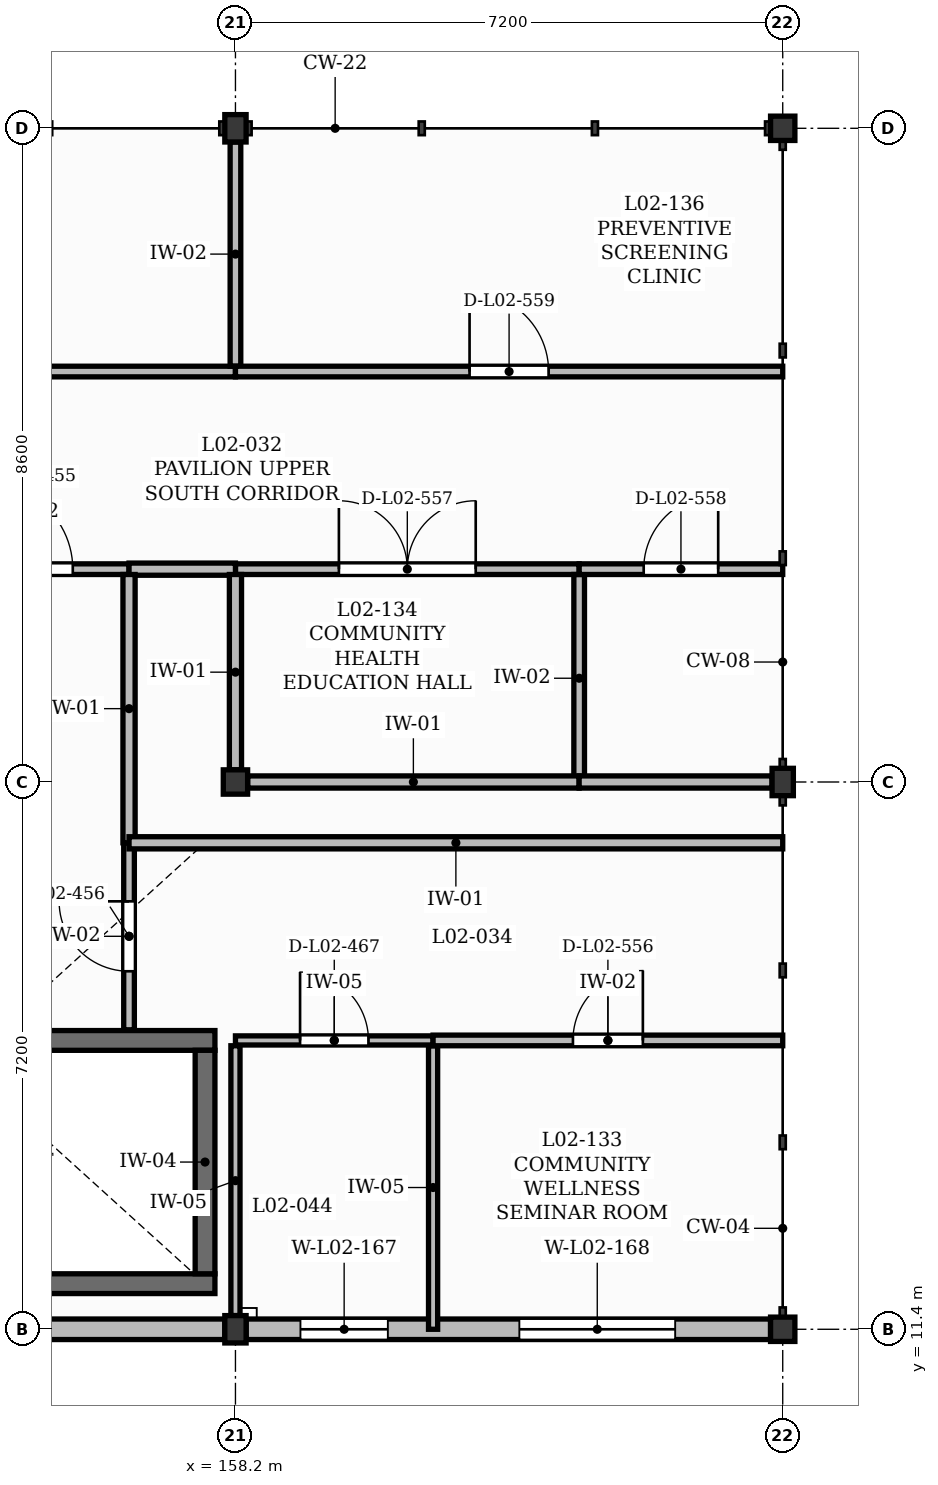
"""IFC4 building model, lengths in metres.
Left out: names, types, materials, properties, quantities, classifications, styles, units other than length and angle.
Written with IfcOpenShell. Run it as: python <this file> out.ifc"""

import sys

from ifc_helpers import new_model, si_unit, direction, frame, frame_2d, origin, origin_2d, place, context, subcontext, project, spatial, rectangle, extrude, element, fill, save


model = new_model("IFC4")
c1 = context("Model", 3, precision=1e-05, world=origin(), true_north=direction((0.0, 1.0)))
c2 = subcontext(c1, "Body", "Model", "MODEL_VIEW")
j1 = project(units=[si_unit("LENGTHUNIT", "METRE"), si_unit("PLANEANGLEUNIT", "RADIAN")], contexts=[c1])
p1 = place(None, origin())
s1 = spatial("IfcSite", under=j1, at=p1, CompositionType="ELEMENT")
p2 = place(p1, origin())
s2 = spatial("IfcBuilding", under=s1, at=p2, CompositionType="ELEMENT")
p3 = place(p2, frame((0.0, 0.0, 9.0)))
s3 = spatial("IfcBuildingStorey", under=s2, at=p3, CompositionType="ELEMENT", Elevation=9.0)
p4 = place(p3, frame((158.2, 11.4, 0.0), z_axis=(0.0, 0.0, 1.0), x_axis=(1.0, 0.0, 0.0)))
e1 = element("IfcColumn", 1, at=p4, inside=s3, PredefinedType="COLUMN", context=c2, shape_type="SweptSolid", body=[
    extrude(rectangle(XDim=0.28, YDim=0.36, at=origin_2d()), origin(), (0.0, 0.0, 1.0), 7.57),
])
p5 = place(p3, frame((158.2, 18.6, 0.0), z_axis=(0.0, 0.0, 1.0), x_axis=(1.0, 0.0, 0.0)))
e2 = element("IfcColumn", 2, at=p5, inside=s3, PredefinedType="COLUMN", context=c2, shape_type="SweptSolid", body=[
    extrude(rectangle(XDim=0.32, YDim=0.32, at=origin_2d()), origin(), (0.0, 0.0, 1.0), 7.57),
])
p6 = place(p3, frame((158.2, 27.2, 0.0), z_axis=(0.0, 0.0, 1.0), x_axis=(1.0, 0.0, 0.0)))
e3 = element("IfcColumn", 3, at=p6, inside=s3, PredefinedType="COLUMN", context=c2, shape_type="SweptSolid", body=[
    extrude(rectangle(XDim=0.28, YDim=0.36, at=origin_2d()), origin(), (0.0, 0.0, 1.0), 7.57),
])
p7 = place(p3, frame((165.4, 11.4, 0.0), z_axis=(0.0, 0.0, 1.0), x_axis=(1.0, 0.0, 0.0)))
e4 = element("IfcColumn", 4, at=p7, inside=s3, PredefinedType="COLUMN", context=c2, shape_type="SweptSolid", body=[
    extrude(rectangle(XDim=0.32, YDim=0.32, at=origin_2d()), origin(), (0.0, 0.0, 1.0), 9.365),
])
p8 = place(p3, frame((165.4, 18.6, 0.0), z_axis=(0.0, 0.0, 1.0), x_axis=(1.0, 0.0, 0.0)))
e5 = element("IfcColumn", 5, at=p8, inside=s3, PredefinedType="COLUMN", context=c2, shape_type="SweptSolid", body=[
    extrude(rectangle(XDim=0.28, YDim=0.36, at=origin_2d()), origin(), (0.0, 0.0, 1.0), 9.365),
])
p9 = place(p3, frame((165.4, 27.2, 0.0), z_axis=(0.0, 0.0, 1.0), x_axis=(1.0, 0.0, 0.0)))
e6 = element("IfcColumn", 6, at=p9, inside=s3, PredefinedType="COLUMN", context=c2, shape_type="SweptSolid", body=[
    extrude(rectangle(XDim=0.32, YDim=0.32, at=origin_2d()), origin(), (0.0, 0.0, 1.0), 9.365),
])
p10 = place(p3, frame((151.16, 11.4, 0.0), z_axis=(0.0, 0.0, 1.0), x_axis=(1.0, 0.0, 0.0)))
e7 = element("IfcWall", 7, at=p10, inside=s3, PredefinedType="SOLIDWALL", context=c2, shape_type="SweptSolid", body=[
    extrude(rectangle(XDim=6.9, YDim=0.27, at=frame_2d((3.45, 0.0))), origin(), (0.0, 0.0, 1.0), 3.54),
])
p11 = place(p3, frame((158.34, 11.4, 0.0), z_axis=(0.0, 0.0, 1.0), x_axis=(1.0, 0.0, 0.0)))
e8 = element("IfcWall", 8, at=p11, inside=s3, PredefinedType="SOLIDWALL", context=c2, shape_type="SweptSolid", body=[
    extrude(rectangle(XDim=6.9, YDim=0.27, at=frame_2d((3.45, 0.0))), origin(), (0.0, 0.0, 1.0), 3.54),
])
p12 = place(p11, frame((0.715, 0.0, 1.5)))
e9 = element("IfcOpeningElement", 9, at=p12, cuts=e8, PredefinedType="OPENING", context=c2, shape_type="SweptSolid", body=[
    extrude(rectangle(XDim=1.15, YDim=1.25, at=frame_2d((0.575, 0.625))), frame((0.0, 0.145, 0.0), z_axis=(0.0, -1.0, 0.0), x_axis=(1.0, 0.0, 0.0)), (0.0, 0.0, 1.0), 0.29),
])
p13 = place(p11, frame((3.595, 0.0, 1.0)))
e10 = element("IfcOpeningElement", 10, at=p13, cuts=e8, PredefinedType="OPENING", context=c2, shape_type="SweptSolid", body=[
    extrude(rectangle(XDim=2.05, YDim=1.95, at=frame_2d((1.025, 0.975))), frame((0.0, 0.145, 0.0), z_axis=(0.0, -1.0, 0.0), x_axis=(1.0, 0.0, 0.0)), (0.0, 0.0, 1.0), 0.29),
])
for number, where, z_axis, x_axis in (
    (11, (151.27, 12.0, 0.0), (0.0, 0.0, 1.0), (1.0, 0.0, 0.0)),
    (12, (151.27, 15.2, 0.0), (0.0, 0.0, 1.0), (1.0, 0.0, 0.0)),
):
    element("IfcWall", number, at=place(p3, frame(where, z_axis=z_axis, x_axis=x_axis)), inside=s3, PredefinedType="SHEAR", context=c2, shape_type="SweptSolid", body=[
        extrude(rectangle(XDim=6.66, YDim=0.26, at=frame_2d((3.33, 0.0))), origin(), (0.0, 0.0, 1.0), 3.95),
    ])
p14 = place(p3, frame((157.8, 12.13, 0.0), z_axis=(0.0, 0.0, 1.0), x_axis=(0.0, 1.0, 0.0)))
e13 = element("IfcWall", 13, at=p14, inside=s3, PredefinedType="SHEAR", context=c2, shape_type="SweptSolid", body=[
    extrude(rectangle(XDim=2.94, YDim=0.26, at=frame_2d((1.47, 0.0))), origin(), (0.0, 0.0, 1.0), 3.95),
])
p15 = place(p3, frame((151.4, 24.0, 0.0), z_axis=(0.0, 0.0, 1.0), x_axis=(1.0, 0.0, 0.0)))
e14 = element("IfcWall", 14, at=p15, inside=s3, PredefinedType="PARTITIONING", context=c2, shape_type="SweptSolid", body=[
    extrude(rectangle(XDim=6.8, YDim=0.14, at=frame_2d((3.4, 0.0))), origin(), (0.0, 0.0, 1.0), 3.78),
])
p16 = place(p15, frame((2.5, 0.0, 0.0)))
e15 = element("IfcOpeningElement", 15, at=p16, cuts=e14, PredefinedType="OPENING", context=c2, shape_type="SweptSolid", body=[
    extrude(rectangle(XDim=1.8, YDim=2.3, at=frame_2d((0.9, 1.15))), frame((0.0, 0.08, 0.0), z_axis=(0.0, -1.0, 0.0), x_axis=(1.0, 0.0, 0.0)), (0.0, 0.0, 1.0), 0.16),
])
p17 = place(p3, frame((154.2, 21.4, 0.0), z_axis=(0.0, 0.0, 1.0), x_axis=(1.0, 0.0, 0.0)))
e16 = element("IfcWall", 16, at=p17, inside=s3, PredefinedType="PARTITIONING", context=c2, shape_type="SweptSolid", body=[
    extrude(rectangle(XDim=2.6, YDim=0.14, at=frame_2d((1.3, 0.0))), origin(), (0.0, 0.0, 1.0), 3.78),
])
p18 = place(p17, frame((0.74, 0.0, 0.0)))
e17 = element("IfcOpeningElement", 17, at=p18, cuts=e16, PredefinedType="OPENING", context=c2, shape_type="SweptSolid", body=[
    extrude(rectangle(XDim=1.12, YDim=2.15, at=frame_2d((0.56, 1.075))), frame((0.0, 0.08, 0.0), z_axis=(0.0, -1.0, 0.0), x_axis=(1.0, 0.0, 0.0)), (0.0, 0.0, 1.0), 0.16),
])
p19 = place(p3, frame((156.8, 15.34, 0.0), z_axis=(0.0, 0.0, 1.0), x_axis=(0.0, 1.0, 0.0)))
e18 = element("IfcWall", 18, at=p19, inside=s3, PredefinedType="PARTITIONING", context=c2, shape_type="SweptSolid", body=[
    extrude(rectangle(XDim=2.46, YDim=0.14, at=frame_2d((1.23, 0.0))), origin(), (0.0, 0.0, 1.0), 3.78),
])
p20 = place(p19, frame((0.77, 0.0, 0.0)))
e19 = element("IfcOpeningElement", 19, at=p20, cuts=e18, PredefinedType="OPENING", context=c2, shape_type="SweptSolid", body=[
    extrude(rectangle(XDim=0.92, YDim=2.1, at=frame_2d((0.46, 1.05))), frame((0.0, 0.08, 0.0), z_axis=(0.0, -1.0, 0.0), x_axis=(1.0, 0.0, 0.0)), (0.0, 0.0, 1.0), 0.16),
])
p21 = place(p3, frame((158.2, 15.2, 0.0), z_axis=(0.0, 0.0, 1.0), x_axis=(1.0, 0.0, 0.0)))
e20 = element("IfcWall", 20, at=p21, inside=s3, PredefinedType="PLUMBINGWALL", context=c2, shape_type="SweptSolid", body=[
    extrude(rectangle(XDim=2.6, YDim=0.12, at=frame_2d((1.3, 0.0))), origin(), (0.0, 0.0, 1.0), 3.78),
])
p22 = place(p21, frame((0.85, 0.0, 0.0)))
e21 = element("IfcOpeningElement", 21, at=p22, cuts=e20, PredefinedType="OPENING", context=c2, shape_type="SweptSolid", body=[
    extrude(rectangle(XDim=0.9, YDim=2.1, at=frame_2d((0.45, 1.05))), frame((0.0, 0.07, 0.0), z_axis=(0.0, -1.0, 0.0), x_axis=(1.0, 0.0, 0.0)), (0.0, 0.0, 1.0), 0.14),
])
p23 = place(p3, frame((158.2, 21.4, 0.0), z_axis=(0.0, 0.0, 1.0), x_axis=(1.0, 0.0, 0.0)))
e22 = element("IfcWall", 22, at=p23, inside=s3, PredefinedType="PARTITIONING", context=c2, shape_type="SweptSolid", body=[
    extrude(rectangle(XDim=4.522, YDim=0.14, at=frame_2d((2.261, 0.0))), origin(), (0.0, 0.0, 1.0), 3.78),
])
p24 = place(p23, frame((1.361, 0.0, 0.0)))
e23 = element("IfcOpeningElement", 23, at=p24, cuts=e22, PredefinedType="OPENING", context=c2, shape_type="SweptSolid", body=[
    extrude(rectangle(XDim=1.8, YDim=2.3, at=frame_2d((0.9, 1.15))), frame((0.0, 0.08, 0.0), z_axis=(0.0, -1.0, 0.0), x_axis=(1.0, 0.0, 0.0)), (0.0, 0.0, 1.0), 0.16),
])
p25 = place(p3, frame((158.2, 24.07, 0.0), z_axis=(0.0, 0.0, 1.0), x_axis=(0.0, 1.0, 0.0)))
e24 = element("IfcWall", 24, at=p25, inside=s3, PredefinedType="PARTITIONING", context=c2, shape_type="SweptSolid", body=[
    extrude(rectangle(XDim=2.95, YDim=0.14, at=frame_2d((1.475, 0.0))), origin(), (0.0, 0.0, 1.0), 3.78),
])
p26 = place(p3, frame((158.2, 24.0, 0.0), z_axis=(0.0, 0.0, 1.0), x_axis=(1.0, 0.0, 0.0)))
e25 = element("IfcWall", 25, at=p26, inside=s3, PredefinedType="PARTITIONING", context=c2, shape_type="SweptSolid", body=[
    extrude(rectangle(XDim=7.2, YDim=0.14, at=frame_2d((3.6, 0.0))), origin(), (0.0, 0.0, 1.0), 3.78),
])
p27 = place(p26, frame((3.08, 0.0, 0.0)))
e26 = element("IfcOpeningElement", 26, at=p27, cuts=e25, PredefinedType="OPENING", context=c2, shape_type="SweptSolid", body=[
    extrude(rectangle(XDim=1.04, YDim=2.1, at=frame_2d((0.52, 1.05))), frame((0.0, 0.08, 0.0), z_axis=(0.0, -1.0, 0.0), x_axis=(1.0, 0.0, 0.0)), (0.0, 0.0, 1.0), 0.16),
])
p28 = place(p3, frame((160.8, 11.4, 0.0), z_axis=(0.0, 0.0, 1.0), x_axis=(0.0, 1.0, 0.0)))
e27 = element("IfcWall", 27, at=p28, inside=s3, PredefinedType="PLUMBINGWALL", context=c2, shape_type="SweptSolid", body=[
    extrude(rectangle(XDim=3.73, YDim=0.12, at=frame_2d((1.865, 0.0))), origin(), (0.0, 0.0, 1.0), 3.78),
])
p29 = place(p3, frame((160.8, 15.2, 0.0), z_axis=(0.0, 0.0, 1.0), x_axis=(1.0, 0.0, 0.0)))
e28 = element("IfcWall", 28, at=p29, inside=s3, PredefinedType="PARTITIONING", context=c2, shape_type="SweptSolid", body=[
    extrude(rectangle(XDim=4.6, YDim=0.14, at=frame_2d((2.3, 0.0))), origin(), (0.0, 0.0, 1.0), 3.78),
])
p30 = place(p29, frame((1.84, 0.0, 0.0)))
e29 = element("IfcOpeningElement", 29, at=p30, cuts=e28, PredefinedType="OPENING", context=c2, shape_type="SweptSolid", body=[
    extrude(rectangle(XDim=0.92, YDim=2.1, at=frame_2d((0.46, 1.05))), frame((0.0, 0.08, 0.0), z_axis=(0.0, -1.0, 0.0), x_axis=(1.0, 0.0, 0.0)), (0.0, 0.0, 1.0), 0.16),
])
p31 = place(p3, frame((162.722, 18.6, 0.0), z_axis=(0.0, 0.0, 1.0), x_axis=(0.0, 1.0, 0.0)))
e30 = element("IfcWall", 30, at=p31, inside=s3, PredefinedType="PARTITIONING", context=c2, shape_type="SweptSolid", body=[
    extrude(rectangle(XDim=2.73, YDim=0.14, at=frame_2d((1.365, 0.0))), origin(), (0.0, 0.0, 1.0), 3.78),
])
p32 = place(p3, frame((162.722, 21.4, 0.0), z_axis=(0.0, 0.0, 1.0), x_axis=(1.0, 0.0, 0.0)))
e31 = element("IfcWall", 31, at=p32, inside=s3, PredefinedType="PARTITIONING", context=c2, shape_type="SweptSolid", body=[
    extrude(rectangle(XDim=2.678, YDim=0.14, at=frame_2d((1.339, 0.0))), origin(), (0.0, 0.0, 1.0), 3.78),
])
p33 = place(p32, frame((0.849, 0.0, 0.0)))
e32 = element("IfcOpeningElement", 32, at=p33, cuts=e31, PredefinedType="OPENING", context=c2, shape_type="SweptSolid", body=[
    extrude(rectangle(XDim=0.98, YDim=2.15, at=frame_2d((0.49, 1.075))), frame((0.0, 0.08, 0.0), z_axis=(0.0, -1.0, 0.0), x_axis=(1.0, 0.0, 0.0)), (0.0, 0.0, 1.0), 0.16),
])
p34 = place(p3, frame((156.8, 21.4, 0.0), z_axis=(0.0, 0.0, 1.0), x_axis=(1.0, 0.0, 0.0)))
e33 = element("IfcWall", 33, at=p34, inside=s3, PredefinedType="PARTITIONING", context=c2, shape_type="SweptSolid", body=[
    extrude(rectangle(XDim=1.4, YDim=0.16, at=frame_2d((0.7, 0.0))), origin(), (0.0, 0.0, 1.0), 3.78),
])
p35 = place(p3, frame((156.8, 17.8, 0.0), z_axis=(0.0, 0.0, 1.0), x_axis=(0.0, 1.0, 0.0)))
e34 = element("IfcWall", 34, at=p35, inside=s3, PredefinedType="PARTITIONING", context=c2, shape_type="SweptSolid", body=[
    extrude(rectangle(XDim=3.53, YDim=0.16, at=frame_2d((1.765, 0.0))), origin(), (0.0, 0.0, 1.0), 3.78),
])
p36 = place(p3, frame((165.4, 17.8, 0.0), z_axis=(0.0, 0.0, 1.0), x_axis=(-1.0, 0.0, 0.0)))
e35 = element("IfcWall", 35, at=p36, inside=s3, PredefinedType="PARTITIONING", context=c2, shape_type="SweptSolid", body=[
    extrude(rectangle(XDim=8.6, YDim=0.16, at=frame_2d((4.3, 0.0))), origin(), (0.0, 0.0, 1.0), 3.78),
])
p37 = place(p3, frame((158.2, 11.58, 0.0), z_axis=(0.0, 0.0, 1.0), x_axis=(0.0, 1.0, 0.0)))
e36 = element("IfcWall", 36, at=p37, inside=s3, PredefinedType="PLUMBINGWALL", context=c2, shape_type="SweptSolid", body=[
    extrude(rectangle(XDim=3.55, YDim=0.12, at=frame_2d((1.775, 0.0))), origin(), (0.0, 0.0, 1.0), 3.78),
])
p38 = place(p3, frame((158.36, 18.6, 0.0), z_axis=(0.0, 0.0, 1.0), x_axis=(1.0, 0.0, 0.0)))
e37 = element("IfcWall", 37, at=p38, inside=s3, PredefinedType="PARTITIONING", context=c2, shape_type="SweptSolid", body=[
    extrude(rectangle(XDim=4.362, YDim=0.16, at=frame_2d((2.181, 0.0))), origin(), (0.0, 0.0, 1.0), 3.78),
])
p39 = place(p3, frame((158.2, 18.76, 0.0), z_axis=(0.0, 0.0, 1.0), x_axis=(0.0, 1.0, 0.0)))
e38 = element("IfcWall", 38, at=p39, inside=s3, PredefinedType="PARTITIONING", context=c2, shape_type="SweptSolid", body=[
    extrude(rectangle(XDim=2.57, YDim=0.16, at=frame_2d((1.285, 0.0))), origin(), (0.0, 0.0, 1.0), 3.78),
])
p40 = place(p3, frame((162.722, 18.6, 0.0), z_axis=(0.0, 0.0, 1.0), x_axis=(1.0, 0.0, 0.0)))
e39 = element("IfcWall", 39, at=p40, inside=s3, PredefinedType="PARTITIONING", context=c2, shape_type="SweptSolid", body=[
    extrude(rectangle(XDim=2.538, YDim=0.16, at=frame_2d((1.269, 0.0))), origin(), (0.0, 0.0, 1.0), 3.78),
])
p41 = place(p12, origin())
e40 = element("IfcWindow", 40, at=p41, inside=s3, PartitioningType="SINGLE_PANEL", PredefinedType="WINDOW", context=c2, shape_type="SweptSolid", body=[
    extrude(rectangle(XDim=1.15, YDim=1.25, at=frame_2d((0.575, 0.625))), frame((0.0, 0.03, 0.0), z_axis=(0.0, -1.0, 0.0), x_axis=(1.0, 0.0, 0.0)), (0.0, 0.0, 1.0), 0.06),
])
fill(e9, e40)
p42 = place(p13, origin())
e41 = element("IfcWindow", 41, at=p42, inside=s3, PartitioningType="DOUBLE_PANEL_VERTICAL", PredefinedType="WINDOW", context=c2, shape_type="SweptSolid", body=[
    extrude(rectangle(XDim=2.05, YDim=1.95, at=frame_2d((1.025, 0.975))), frame((0.0, 0.03, 0.0), z_axis=(0.0, -1.0, 0.0), x_axis=(1.0, 0.0, 0.0)), (0.0, 0.0, 1.0), 0.06),
])
fill(e10, e41)
p43 = place(p18, origin())
e42 = element("IfcDoor", 42, at=p43, inside=s3, OperationType="SINGLE_SWING_LEFT", PredefinedType="DOOR", context=c2, shape_type="SweptSolid", body=[
    extrude(rectangle(XDim=1.12, YDim=2.15, at=frame_2d((0.56, 1.075))), frame((0.0, 0.025, 0.0), z_axis=(0.0, -1.0, 0.0), x_axis=(1.0, 0.0, 0.0)), (0.0, 0.0, 1.0), 0.05),
])
fill(e17, e42)
p44 = place(p20, origin())
e43 = element("IfcDoor", 43, at=p44, inside=s3, OperationType="SINGLE_SWING_RIGHT", PredefinedType="DOOR", context=c2, shape_type="SweptSolid", body=[
    extrude(rectangle(XDim=0.92, YDim=2.1, at=frame_2d((0.46, 1.05))), frame((0.0, 0.025, 0.0), z_axis=(0.0, -1.0, 0.0), x_axis=(1.0, 0.0, 0.0)), (0.0, 0.0, 1.0), 0.05),
])
fill(e19, e43)
p45 = place(p22, origin())
e44 = element("IfcDoor", 44, at=p45, inside=s3, OperationType="SINGLE_SWING_LEFT", PredefinedType="DOOR", context=c2, shape_type="SweptSolid", body=[
    extrude(rectangle(XDim=0.9, YDim=2.1, at=frame_2d((0.45, 1.05))), frame((0.0, 0.025, 0.0), z_axis=(0.0, -1.0, 0.0), x_axis=(1.0, 0.0, 0.0)), (0.0, 0.0, 1.0), 0.05),
])
fill(e21, e44)
p46 = place(p30, origin())
e45 = element("IfcDoor", 45, at=p46, inside=s3, OperationType="SINGLE_SWING_RIGHT", PredefinedType="DOOR", context=c2, shape_type="SweptSolid", body=[
    extrude(rectangle(XDim=0.92, YDim=2.1, at=frame_2d((0.46, 1.05))), frame((0.0, 0.025, 0.0), z_axis=(0.0, -1.0, 0.0), x_axis=(1.0, 0.0, 0.0)), (0.0, 0.0, 1.0), 0.05),
])
fill(e29, e45)
p47 = place(p24, origin())
e46 = element("IfcDoor", 46, at=p47, inside=s3, OperationType="DOUBLE_DOOR_SINGLE_SWING", PredefinedType="DOOR", context=c2, shape_type="SweptSolid", body=[
    extrude(rectangle(XDim=1.8, YDim=2.3, at=frame_2d((0.9, 1.15))), frame((0.0, 0.025, 0.0), z_axis=(0.0, -1.0, 0.0), x_axis=(1.0, 0.0, 0.0)), (0.0, 0.0, 1.0), 0.05),
])
fill(e23, e46)
p48 = place(p33, origin())
e47 = element("IfcDoor", 47, at=p48, inside=s3, OperationType="SINGLE_SWING_RIGHT", PredefinedType="DOOR", context=c2, shape_type="SweptSolid", body=[
    extrude(rectangle(XDim=0.98, YDim=2.15, at=frame_2d((0.49, 1.075))), frame((0.0, 0.025, 0.0), z_axis=(0.0, -1.0, 0.0), x_axis=(1.0, 0.0, 0.0)), (0.0, 0.0, 1.0), 0.05),
])
fill(e32, e47)
p49 = place(p27, origin())
e48 = element("IfcDoor", 48, at=p49, inside=s3, OperationType="SINGLE_SWING_LEFT", PredefinedType="DOOR", context=c2, shape_type="SweptSolid", body=[
    extrude(rectangle(XDim=1.04, YDim=2.1, at=frame_2d((0.52, 1.05))), frame((0.0, 0.025, 0.0), z_axis=(0.0, -1.0, 0.0), x_axis=(1.0, 0.0, 0.0)), (0.0, 0.0, 1.0), 0.05),
])
fill(e26, e48)
save(model, sys.argv[1])
